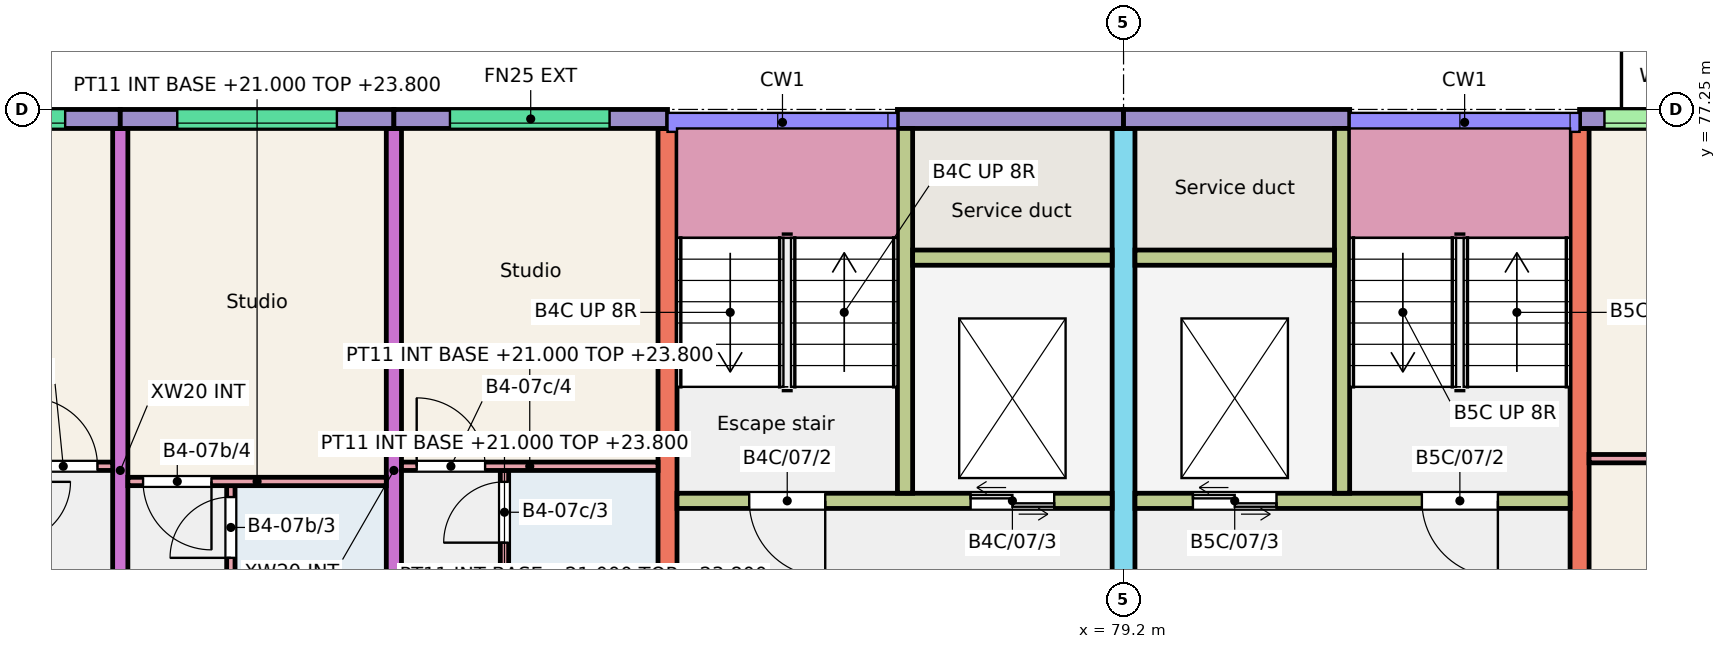
"""IFC4 building model, lengths in metres.
Left out: names, types, materials, properties, quantities, classifications, styles, units other than length and angle.
Written with IfcOpenShell. Run it as: python <this file> out.ifc"""

import sys

from ifc_helpers import new_model, si_unit, direction, frame, frame_2d, origin, place, context, subcontext, project, spatial, rectangle, extrude, element, fill, save


model = new_model("IFC4")
c1 = context("Model", 3, precision=1e-05, world=origin(), true_north=direction((0.0, 1.0)))
c2 = subcontext(c1, "Body", "Model", "MODEL_VIEW")
j1 = project(units=[si_unit("LENGTHUNIT", "METRE"), si_unit("PLANEANGLEUNIT", "RADIAN")], contexts=[c1])
p1 = place(None, origin())
s1 = spatial("IfcSite", under=j1, at=p1, CompositionType="ELEMENT")
p2 = place(p1, origin())
s2 = spatial("IfcBuilding", under=s1, at=p2, CompositionType="ELEMENT")
p3 = place(p2, frame((0.0, 0.0, 21.0)))
s3 = spatial("IfcBuildingStorey", under=s2, at=p3, CompositionType="ELEMENT", Elevation=21.0)
for number, where, z_axis, x_axis in (
    (1, (66.0, 68.0, 0.0), (0.0, 0.0, 1.0), (0.0, 1.0, 0.0)),
    (2, (69.6, 68.0, 0.0), (0.0, 0.0, 1.0), (0.0, 1.0, 0.0)),
):
    element("IfcWall", number, at=place(p3, frame(where, z_axis=z_axis, x_axis=x_axis)), inside=s3, PredefinedType="SHEAR", context=c2, shape_type="SweptSolid", body=[
        extrude(rectangle(XDim=9.0, YDim=0.2, at=frame_2d((4.5, 0.0))), origin(), (0.0, 0.0, 1.0), 3.0),
    ])
p4 = place(p3, frame((73.2, 68.0, 0.0), z_axis=(0.0, 0.0, 1.0), x_axis=(0.0, 1.0, 0.0)))
e3 = element("IfcWall", 3, at=p4, inside=s3, PredefinedType="SHEAR", context=c2, shape_type="SweptSolid", body=[
    extrude(rectangle(XDim=9.0, YDim=0.25, at=frame_2d((4.5, 0.0))), origin(), (0.0, 0.0, 1.0), 3.0),
])
p5 = place(p3, frame((79.2, 66.0, 0.0), z_axis=(0.0, 0.0, 1.0), x_axis=(0.0, 1.0, 0.0)))
e4 = element("IfcWall", 4, at=p5, inside=s3, PredefinedType="SHEAR", context=c2, shape_type="SweptSolid", body=[
    extrude(rectangle(XDim=11.0, YDim=0.3, at=frame_2d((5.5, 0.0))), origin(), (0.0, 0.0, 1.0), 3.0),
])
p6 = place(p5, frame((0.3, 0.0, 0.0)))
e5 = element("IfcOpeningElement", 5, at=p6, cuts=e4, PredefinedType="OPENING", context=c2, shape_type="SweptSolid", body=[
    extrude(rectangle(XDim=1.2, YDim=2.1, at=frame_2d((0.6, 1.05))), frame((0.0, 0.16, 0.0), z_axis=(0.0, -1.0, 0.0), x_axis=(1.0, 0.0, 0.0)), (0.0, 0.0, 1.0), 0.32),
])
p7 = place(p3, frame((85.2, 68.0, 0.0), z_axis=(0.0, 0.0, 1.0), x_axis=(0.0, 1.0, 0.0)))
e6 = element("IfcWall", 6, at=p7, inside=s3, PredefinedType="SHEAR", context=c2, shape_type="SweptSolid", body=[
    extrude(rectangle(XDim=9.0, YDim=0.25, at=frame_2d((4.5, 0.0))), origin(), (0.0, 0.0, 1.0), 3.0),
])
p8 = place(p3, frame((62.4, 77.125, 0.0), z_axis=(0.0, 0.0, 1.0), x_axis=(1.0, 0.0, 0.0)))
e7 = element("IfcWall", 7, at=p8, inside=s3, PredefinedType="SOLIDWALL", context=c2, shape_type="SweptSolid", body=[
    extrude(rectangle(XDim=3.6, YDim=0.25, at=frame_2d((1.8, 0.0))), origin(), (0.0, 0.0, 1.0), 3.0),
])
p9 = place(p8, frame((0.775, 0.0, 1.2)))
e8 = element("IfcOpeningElement", 8, at=p9, cuts=e7, PredefinedType="OPENING", context=c2, shape_type="SweptSolid", body=[
    extrude(rectangle(XDim=2.1, YDim=1.2, at=frame_2d((1.05, 0.6))), frame((0.0, 0.135, 0.0), z_axis=(0.0, -1.0, 0.0), x_axis=(1.0, 0.0, 0.0)), (0.0, 0.0, 1.0), 0.27),
])
p10 = place(p3, frame((66.0, 77.125, 0.0), z_axis=(0.0, 0.0, 1.0), x_axis=(1.0, 0.0, 0.0)))
e9 = element("IfcWall", 9, at=p10, inside=s3, PredefinedType="SOLIDWALL", context=c2, shape_type="SweptSolid", body=[
    extrude(rectangle(XDim=3.6, YDim=0.25, at=frame_2d((1.8, 0.0))), origin(), (0.0, 0.0, 1.0), 3.0),
])
p11 = place(p10, frame((0.75, 0.0, 1.2)))
e10 = element("IfcOpeningElement", 10, at=p11, cuts=e9, PredefinedType="OPENING", context=c2, shape_type="SweptSolid", body=[
    extrude(rectangle(XDim=2.1, YDim=1.2, at=frame_2d((1.05, 0.6))), frame((0.0, 0.135, 0.0), z_axis=(0.0, -1.0, 0.0), x_axis=(1.0, 0.0, 0.0)), (0.0, 0.0, 1.0), 0.27),
])
p12 = place(p3, frame((69.6, 77.125, 0.0), z_axis=(0.0, 0.0, 1.0), x_axis=(1.0, 0.0, 0.0)))
e11 = element("IfcWall", 11, at=p12, inside=s3, PredefinedType="SOLIDWALL", context=c2, shape_type="SweptSolid", body=[
    extrude(rectangle(XDim=3.6, YDim=0.25, at=frame_2d((1.8, 0.0))), origin(), (0.0, 0.0, 1.0), 3.0),
])
p13 = place(p12, frame((0.738, 0.0, 1.2)))
e12 = element("IfcOpeningElement", 12, at=p13, cuts=e11, PredefinedType="OPENING", context=c2, shape_type="SweptSolid", body=[
    extrude(rectangle(XDim=2.1, YDim=1.2, at=frame_2d((1.05, 0.6))), frame((0.0, 0.135, 0.0), z_axis=(0.0, -1.0, 0.0), x_axis=(1.0, 0.0, 0.0)), (0.0, 0.0, 1.0), 0.27),
])
p14 = place(p3, frame((76.225, 77.125, 0.0), z_axis=(0.0, 0.0, 1.0), x_axis=(1.0, 0.0, 0.0)))
e13 = element("IfcWall", 13, at=p14, inside=s3, PredefinedType="SOLIDWALL", context=c2, shape_type="SweptSolid", body=[
    extrude(rectangle(XDim=2.975, YDim=0.25, at=frame_2d((1.487, 0.0))), origin(), (0.0, 0.0, 1.0), 3.0),
])
p15 = place(p3, frame((73.325, 72.1, 0.0), z_axis=(0.0, 0.0, 1.0), x_axis=(1.0, 0.0, 0.0)))
e14 = element("IfcWall", 14, at=p15, inside=s3, PredefinedType="SHEAR", context=c2, shape_type="SweptSolid", body=[
    extrude(rectangle(XDim=5.725, YDim=0.2, at=frame_2d((2.863, 0.0))), origin(), (0.0, 0.0, 1.0), 3.0),
])
p16 = place(p15, frame((0.95, 0.0, 0.0)))
e15 = element("IfcOpeningElement", 15, at=p16, cuts=e14, PredefinedType="OPENING", context=c2, shape_type="SweptSolid", body=[
    extrude(rectangle(XDim=1.0, YDim=2.1, at=frame_2d((0.5, 1.05))), frame((0.0, 0.11, 0.0), z_axis=(0.0, -1.0, 0.0), x_axis=(1.0, 0.0, 0.0)), (0.0, 0.0, 1.0), 0.22),
])
p17 = place(p15, frame((3.863, 0.0, 0.0)))
e16 = element("IfcOpeningElement", 16, at=p17, cuts=e14, PredefinedType="OPENING", context=c2, shape_type="SweptSolid", body=[
    extrude(rectangle(XDim=1.1, YDim=2.1, at=frame_2d((0.55, 1.05))), frame((0.0, 0.11, 0.0), z_axis=(0.0, -1.0, 0.0), x_axis=(1.0, 0.0, 0.0)), (0.0, 0.0, 1.0), 0.22),
])
p18 = place(p3, frame((76.325, 72.2, 0.0), z_axis=(0.0, 0.0, 1.0), x_axis=(0.0, 1.0, 0.0)))
e17 = element("IfcWall", 17, at=p18, inside=s3, PredefinedType="SHEAR", context=c2, shape_type="SweptSolid", body=[
    extrude(rectangle(XDim=4.8, YDim=0.2, at=frame_2d((2.4, 0.0))), origin(), (0.0, 0.0, 1.0), 3.0),
])
p19 = place(p3, frame((76.425, 75.3, 0.0), z_axis=(0.0, 0.0, 1.0), x_axis=(1.0, 0.0, 0.0)))
e18 = element("IfcWall", 18, at=p19, inside=s3, PredefinedType="SHEAR", context=c2, shape_type="SweptSolid", body=[
    extrude(rectangle(XDim=2.625, YDim=0.2, at=frame_2d((1.312, 0.0))), origin(), (0.0, 0.0, 1.0), 3.0),
])
p20 = place(p3, frame((79.2, 77.125, 0.0), z_axis=(0.0, 0.0, 1.0), x_axis=(1.0, 0.0, 0.0)))
e19 = element("IfcWall", 19, at=p20, inside=s3, PredefinedType="SOLIDWALL", context=c2, shape_type="SweptSolid", body=[
    extrude(rectangle(XDim=2.975, YDim=0.25, at=frame_2d((1.488, 0.0))), origin(), (0.0, 0.0, 1.0), 3.0),
])
p21 = place(p3, frame((79.35, 72.1, 0.0), z_axis=(0.0, 0.0, 1.0), x_axis=(1.0, 0.0, 0.0)))
e20 = element("IfcWall", 20, at=p21, inside=s3, PredefinedType="SHEAR", context=c2, shape_type="SweptSolid", body=[
    extrude(rectangle(XDim=5.725, YDim=0.2, at=frame_2d((2.862, 0.0))), origin(), (0.0, 0.0, 1.0), 3.0),
])
p22 = place(p21, frame((3.775, 0.0, 0.0)))
e21 = element("IfcOpeningElement", 21, at=p22, cuts=e20, PredefinedType="OPENING", context=c2, shape_type="SweptSolid", body=[
    extrude(rectangle(XDim=1.0, YDim=2.1, at=frame_2d((0.5, 1.05))), frame((0.0, 0.11, 0.0), z_axis=(0.0, -1.0, 0.0), x_axis=(1.0, 0.0, 0.0)), (0.0, 0.0, 1.0), 0.22),
])
p23 = place(p21, frame((0.762, 0.0, 0.0)))
e22 = element("IfcOpeningElement", 22, at=p23, cuts=e20, PredefinedType="OPENING", context=c2, shape_type="SweptSolid", body=[
    extrude(rectangle(XDim=1.1, YDim=2.1, at=frame_2d((0.55, 1.05))), frame((0.0, 0.11, 0.0), z_axis=(0.0, -1.0, 0.0), x_axis=(1.0, 0.0, 0.0)), (0.0, 0.0, 1.0), 0.22),
])
p24 = place(p3, frame((82.075, 72.2, 0.0), z_axis=(0.0, 0.0, 1.0), x_axis=(0.0, 1.0, 0.0)))
e23 = element("IfcWall", 23, at=p24, inside=s3, PredefinedType="SHEAR", context=c2, shape_type="SweptSolid", body=[
    extrude(rectangle(XDim=4.8, YDim=0.2, at=frame_2d((2.4, 0.0))), origin(), (0.0, 0.0, 1.0), 3.0),
])
p25 = place(p3, frame((79.35, 75.3, 0.0), z_axis=(0.0, 0.0, 1.0), x_axis=(1.0, 0.0, 0.0)))
e24 = element("IfcWall", 24, at=p25, inside=s3, PredefinedType="SHEAR", context=c2, shape_type="SweptSolid", body=[
    extrude(rectangle(XDim=2.625, YDim=0.2, at=frame_2d((1.312, 0.0))), origin(), (0.0, 0.0, 1.0), 3.0),
])
p26 = place(p3, frame((85.2, 77.125, 0.0), z_axis=(0.0, 0.0, 1.0), x_axis=(1.0, 0.0, 0.0)))
e25 = element("IfcWall", 25, at=p26, inside=s3, PredefinedType="SOLIDWALL", context=c2, shape_type="SweptSolid", body=[
    extrude(rectangle(XDim=3.6, YDim=0.25, at=frame_2d((1.8, 0.0))), origin(), (0.0, 0.0, 1.0), 3.0),
])
p27 = place(p26, frame((0.327, 0.0, 1.2)))
e26 = element("IfcOpeningElement", 26, at=p27, cuts=e25, PredefinedType="OPENING", context=c2, shape_type="SweptSolid", body=[
    extrude(rectangle(XDim=1.5, YDim=1.2, at=frame_2d((0.75, 0.6))), frame((0.0, 0.135, 0.0), z_axis=(0.0, -1.0, 0.0), x_axis=(1.0, 0.0, 0.0)), (0.0, 0.0, 1.0), 0.27),
])
p28 = place(p26, frame((2.129, 0.0, 0.0)))
e27 = element("IfcOpeningElement", 27, at=p28, cuts=e25, PredefinedType="OPENING", context=c2, shape_type="SweptSolid", body=[
    extrude(rectangle(XDim=1.0, YDim=2.1, at=frame_2d((0.5, 1.05))), frame((0.0, 0.135, 0.0), z_axis=(0.0, -1.0, 0.0), x_axis=(1.0, 0.0, 0.0)), (0.0, 0.0, 1.0), 0.27),
])
p29 = place(p3, frame((62.55, 72.555, 0.0), z_axis=(0.0, 0.0, 1.0), x_axis=(1.0, 0.0, 0.0)))
e28 = element("IfcWall", 28, at=p29, inside=s3, PredefinedType="PARTITIONING", context=c2, shape_type="SweptSolid", body=[
    extrude(rectangle(XDim=3.35, YDim=0.11, at=frame_2d((1.675, 0.0))), origin(), (0.0, 0.0, 1.0), 2.75),
])
p30 = place(p29, frame((2.25, 0.0, 0.0)))
e29 = element("IfcOpeningElement", 29, at=p30, cuts=e28, PredefinedType="OPENING", context=c2, shape_type="SweptSolid", body=[
    extrude(rectangle(XDim=0.9, YDim=2.1, at=frame_2d((0.45, 1.05))), frame((0.0, 0.065, 0.0), z_axis=(0.0, -1.0, 0.0), x_axis=(1.0, 0.0, 0.0)), (0.0, 0.0, 1.0), 0.13),
])
p31 = place(p3, frame((67.455, 68.0, 0.0), z_axis=(0.0, 0.0, 1.0), x_axis=(0.0, 1.0, 0.0)))
e30 = element("IfcWall", 30, at=p31, inside=s3, PredefinedType="PARTITIONING", context=c2, shape_type="SweptSolid", body=[
    extrude(rectangle(XDim=4.3, YDim=0.11, at=frame_2d((2.15, 0.0))), origin(), (0.0, 0.0, 1.0), 2.8),
])
p32 = place(p31, frame((0.2, 0.0, 0.0)))
e31 = element("IfcOpeningElement", 31, at=p32, cuts=e30, PredefinedType="OPENING", context=c2, shape_type="SweptSolid", body=[
    extrude(rectangle(XDim=0.8, YDim=2.1, at=frame_2d((0.4, 1.05))), frame((0.0, 0.065, 0.0), z_axis=(0.0, -1.0, 0.0), x_axis=(1.0, 0.0, 0.0)), (0.0, 0.0, 1.0), 0.13),
])
p33 = place(p31, frame((3.35, 0.0, 0.0)))
e32 = element("IfcOpeningElement", 32, at=p33, cuts=e30, PredefinedType="OPENING", context=c2, shape_type="SweptSolid", body=[
    extrude(rectangle(XDim=0.8, YDim=2.1, at=frame_2d((0.4, 1.05))), frame((0.0, 0.065, 0.0), z_axis=(0.0, -1.0, 0.0), x_axis=(1.0, 0.0, 0.0)), (0.0, 0.0, 1.0), 0.13),
])
p34 = place(p3, frame((66.1, 72.355, 0.0), z_axis=(0.0, 0.0, 1.0), x_axis=(1.0, 0.0, 0.0)))
e33 = element("IfcWall", 33, at=p34, inside=s3, PredefinedType="PARTITIONING", context=c2, shape_type="SweptSolid", body=[
    extrude(rectangle(XDim=3.4, YDim=0.11, at=frame_2d((1.7, 0.0))), origin(), (0.0, 0.0, 1.0), 2.8),
])
p35 = place(p34, frame((0.2, 0.0, 0.0)))
e34 = element("IfcOpeningElement", 34, at=p35, cuts=e33, PredefinedType="OPENING", context=c2, shape_type="SweptSolid", body=[
    extrude(rectangle(XDim=0.9, YDim=2.1, at=frame_2d((0.45, 1.05))), frame((0.0, 0.065, 0.0), z_axis=(0.0, -1.0, 0.0), x_axis=(1.0, 0.0, 0.0)), (0.0, 0.0, 1.0), 0.13),
])
p36 = place(p3, frame((71.055, 68.0, 0.0), z_axis=(0.0, 0.0, 1.0), x_axis=(0.0, 1.0, 0.0)))
e35 = element("IfcWall", 35, at=p36, inside=s3, PredefinedType="PARTITIONING", context=c2, shape_type="SweptSolid", body=[
    extrude(rectangle(XDim=4.5, YDim=0.11, at=frame_2d((2.25, 0.0))), origin(), (0.0, 0.0, 1.0), 2.8),
])
p37 = place(p36, frame((0.2, 0.0, 0.0)))
e36 = element("IfcOpeningElement", 36, at=p37, cuts=e35, PredefinedType="OPENING", context=c2, shape_type="SweptSolid", body=[
    extrude(rectangle(XDim=0.8, YDim=2.1, at=frame_2d((0.4, 1.05))), frame((0.0, 0.065, 0.0), z_axis=(0.0, -1.0, 0.0), x_axis=(1.0, 0.0, 0.0)), (0.0, 0.0, 1.0), 0.13),
])
p38 = place(p36, frame((3.55, 0.0, 0.0)))
e37 = element("IfcOpeningElement", 37, at=p38, cuts=e35, PredefinedType="OPENING", context=c2, shape_type="SweptSolid", body=[
    extrude(rectangle(XDim=0.8, YDim=2.1, at=frame_2d((0.4, 1.05))), frame((0.0, 0.065, 0.0), z_axis=(0.0, -1.0, 0.0), x_axis=(1.0, 0.0, 0.0)), (0.0, 0.0, 1.0), 0.13),
])
p39 = place(p3, frame((69.7, 72.555, 0.0), z_axis=(0.0, 0.0, 1.0), x_axis=(1.0, 0.0, 0.0)))
e38 = element("IfcWall", 38, at=p39, inside=s3, PredefinedType="PARTITIONING", context=c2, shape_type="SweptSolid", body=[
    extrude(rectangle(XDim=3.375, YDim=0.11, at=frame_2d((1.688, 0.0))), origin(), (0.0, 0.0, 1.0), 2.8),
])
p40 = place(p39, frame((0.2, 0.0, 0.0)))
e39 = element("IfcOpeningElement", 39, at=p40, cuts=e38, PredefinedType="OPENING", context=c2, shape_type="SweptSolid", body=[
    extrude(rectangle(XDim=0.9, YDim=2.1, at=frame_2d((0.45, 1.05))), frame((0.0, 0.065, 0.0), z_axis=(0.0, -1.0, 0.0), x_axis=(1.0, 0.0, 0.0)), (0.0, 0.0, 1.0), 0.13),
])
p41 = place(p3, frame((85.325, 72.655, 0.0), z_axis=(0.0, 0.0, 1.0), x_axis=(1.0, 0.0, 0.0)))
e40 = element("IfcWall", 40, at=p41, inside=s3, PredefinedType="PARTITIONING", context=c2, shape_type="SweptSolid", body=[
    extrude(rectangle(XDim=3.375, YDim=0.11, at=frame_2d((1.688, 0.0))), origin(), (0.0, 0.0, 1.0), 2.8),
])
p42 = place(p9, origin())
e41 = element("IfcWindow", 41, at=p42, inside=s3, PartitioningType="SINGLE_PANEL", PredefinedType="WINDOW", context=c2, shape_type="SweptSolid", body=[
    extrude(rectangle(XDim=2.1, YDim=1.2, at=frame_2d((1.05, 0.6))), frame((0.0, -0.025, 0.0), z_axis=(0.0, -1.0, 0.0), x_axis=(1.0, 0.0, 0.0)), (0.0, 0.0, 1.0), 0.06),
])
fill(e8, e41)
p43 = place(p11, origin())
e42 = element("IfcWindow", 42, at=p43, inside=s3, PartitioningType="SINGLE_PANEL", PredefinedType="WINDOW", context=c2, shape_type="SweptSolid", body=[
    extrude(rectangle(XDim=2.1, YDim=1.2, at=frame_2d((1.05, 0.6))), frame((0.0, -0.025, 0.0), z_axis=(0.0, -1.0, 0.0), x_axis=(1.0, 0.0, 0.0)), (0.0, 0.0, 1.0), 0.06),
])
fill(e10, e42)
p44 = place(p13, origin())
e43 = element("IfcWindow", 43, at=p44, inside=s3, PartitioningType="SINGLE_PANEL", PredefinedType="WINDOW", context=c2, shape_type="SweptSolid", body=[
    extrude(rectangle(XDim=2.1, YDim=1.2, at=frame_2d((1.05, 0.6))), frame((0.0, -0.025, 0.0), z_axis=(0.0, -1.0, 0.0), x_axis=(1.0, 0.0, 0.0)), (0.0, 0.0, 1.0), 0.06),
])
fill(e12, e43)
p45 = place(p27, origin())
e44 = element("IfcWindow", 44, at=p45, inside=s3, PartitioningType="SINGLE_PANEL", PredefinedType="WINDOW", context=c2, shape_type="SweptSolid", body=[
    extrude(rectangle(XDim=1.5, YDim=1.2, at=frame_2d((0.75, 0.6))), frame((0.0, -0.025, 0.0), z_axis=(0.0, -1.0, 0.0), x_axis=(1.0, 0.0, 0.0)), (0.0, 0.0, 1.0), 0.06),
])
fill(e26, e44)
p46 = place(p30, origin())
e45 = element("IfcDoor", 45, at=p46, inside=s3, OperationType="SINGLE_SWING_LEFT", PredefinedType="DOOR", context=c2, shape_type="SweptSolid", body=[
    extrude(rectangle(XDim=0.9, YDim=2.1, at=frame_2d((0.45, 1.05))), frame((0.0, 0.025, 0.0), z_axis=(0.0, -1.0, 0.0), x_axis=(1.0, 0.0, 0.0)), (0.0, 0.0, 1.0), 0.05),
])
fill(e29, e45)
p47 = place(p33, origin())
e46 = element("IfcDoor", 46, at=p47, inside=s3, OperationType="SINGLE_SWING_LEFT", PredefinedType="DOOR", context=c2, shape_type="SweptSolid", body=[
    extrude(rectangle(XDim=0.8, YDim=2.1, at=frame_2d((0.4, 1.05))), frame((0.0, 0.025, 0.0), z_axis=(0.0, -1.0, 0.0), x_axis=(1.0, 0.0, 0.0)), (0.0, 0.0, 1.0), 0.05),
])
fill(e32, e46)
p48 = place(p35, origin())
e47 = element("IfcDoor", 47, at=p48, inside=s3, OperationType="SINGLE_SWING_RIGHT", PredefinedType="DOOR", context=c2, shape_type="SweptSolid", body=[
    extrude(rectangle(XDim=0.9, YDim=2.1, at=frame_2d((0.45, 1.05))), frame((0.0, 0.025, 0.0), z_axis=(0.0, -1.0, 0.0), x_axis=(1.0, 0.0, 0.0)), (0.0, 0.0, 1.0), 0.05),
])
fill(e34, e47)
p49 = place(p38, origin())
e48 = element("IfcDoor", 48, at=p49, inside=s3, OperationType="SINGLE_SWING_LEFT", PredefinedType="DOOR", context=c2, shape_type="SweptSolid", body=[
    extrude(rectangle(XDim=0.8, YDim=2.1, at=frame_2d((0.4, 1.05))), frame((0.0, 0.025, 0.0), z_axis=(0.0, -1.0, 0.0), x_axis=(1.0, 0.0, 0.0)), (0.0, 0.0, 1.0), 0.05),
])
fill(e37, e48)
p50 = place(p40, origin())
e49 = element("IfcDoor", 49, at=p50, inside=s3, OperationType="SINGLE_SWING_LEFT", PredefinedType="DOOR", context=c2, shape_type="SweptSolid", body=[
    extrude(rectangle(XDim=0.9, YDim=2.1, at=frame_2d((0.45, 1.05))), frame((0.0, 0.025, 0.0), z_axis=(0.0, -1.0, 0.0), x_axis=(1.0, 0.0, 0.0)), (0.0, 0.0, 1.0), 0.05),
])
fill(e39, e49)
p51 = place(p16, origin())
e50 = element("IfcDoor", 50, at=p51, inside=s3, OperationType="SINGLE_SWING_RIGHT", PredefinedType="DOOR", context=c2, shape_type="SweptSolid", body=[
    extrude(rectangle(XDim=1.0, YDim=2.1, at=frame_2d((0.5, 1.05))), frame((0.0, 0.025, 0.0), z_axis=(0.0, -1.0, 0.0), x_axis=(1.0, 0.0, 0.0)), (0.0, 0.0, 1.0), 0.05),
])
fill(e15, e50)
p52 = place(p17, origin())
e51 = element("IfcDoor", 51, at=p52, inside=s3, OperationType="DOUBLE_DOOR_SLIDING", PredefinedType="DOOR", context=c2, shape_type="SweptSolid", body=[
    extrude(rectangle(XDim=1.1, YDim=2.1, at=frame_2d((0.55, 1.05))), frame((0.0, 0.025, 0.0), z_axis=(0.0, -1.0, 0.0), x_axis=(1.0, 0.0, 0.0)), (0.0, 0.0, 1.0), 0.05),
])
fill(e16, e51)
p53 = place(p22, origin())
e52 = element("IfcDoor", 52, at=p53, inside=s3, OperationType="SINGLE_SWING_RIGHT", PredefinedType="DOOR", context=c2, shape_type="SweptSolid", body=[
    extrude(rectangle(XDim=1.0, YDim=2.1, at=frame_2d((0.5, 1.05))), frame((0.0, 0.025, 0.0), z_axis=(0.0, -1.0, 0.0), x_axis=(1.0, 0.0, 0.0)), (0.0, 0.0, 1.0), 0.05),
])
fill(e21, e52)
p54 = place(p23, origin())
e53 = element("IfcDoor", 53, at=p54, inside=s3, OperationType="DOUBLE_DOOR_SLIDING", PredefinedType="DOOR", context=c2, shape_type="SweptSolid", body=[
    extrude(rectangle(XDim=1.1, YDim=2.1, at=frame_2d((0.55, 1.05))), frame((0.0, 0.025, 0.0), z_axis=(0.0, -1.0, 0.0), x_axis=(1.0, 0.0, 0.0)), (0.0, 0.0, 1.0), 0.05),
])
fill(e22, e53)
save(model, sys.argv[1])
